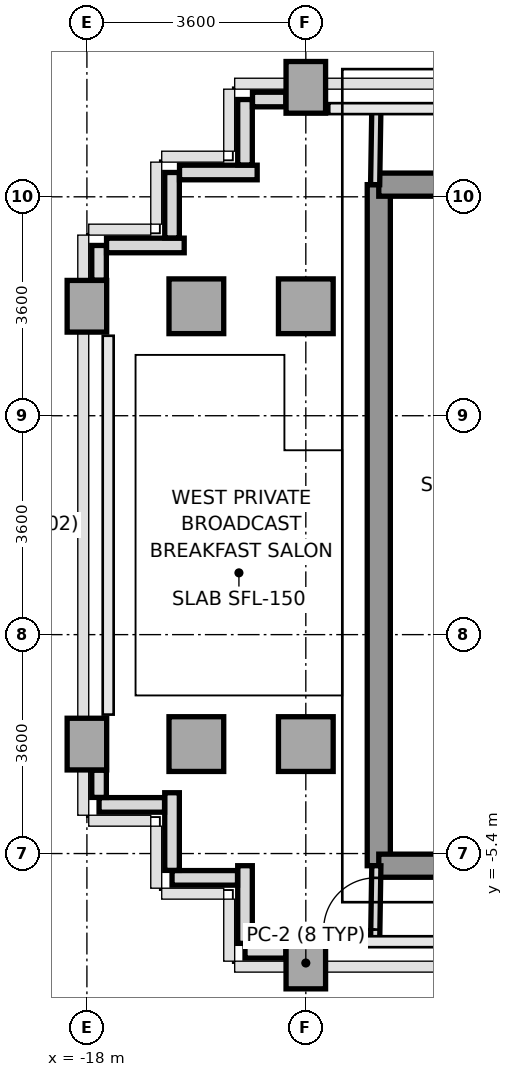
"""IFC4 building model, lengths in metres.
Left out: names, types, materials, properties, quantities, classifications, styles, units other than length and angle.
Written with IfcOpenShell. Run it as: python <this file> out.ifc"""

import sys

from ifc_helpers import new_model, si_unit, direction, frame, frame_2d, origin, origin_2d, place, context, subcontext, project, spatial, rectangle, extrude, source, transform, mapped, element, fill, save


model = new_model("IFC4")
c1 = context("Model", 3, precision=1e-05, world=origin(), true_north=direction((0.0, 1.0)))
c2 = subcontext(c1, "Body", "Model", "MODEL_VIEW")
j1 = project(units=[si_unit("LENGTHUNIT", "METRE"), si_unit("PLANEANGLEUNIT", "RADIAN")], contexts=[c1])
p1 = place(None, origin())
s1 = spatial("IfcSite", under=j1, at=p1, CompositionType="ELEMENT")
p2 = place(p1, origin())
s2 = spatial("IfcBuilding", under=s1, at=p2, CompositionType="ELEMENT")
p3 = place(p2, frame((0.0, 0.0, 194.4)))
s3 = spatial("IfcBuildingStorey", under=s2, at=p3, CompositionType="ELEMENT", Elevation=194.4)
m1 = source(origin(), c2, "Body", "SweptSolid", [
    extrude(rectangle(XDim=0.65, YDim=0.85, at=origin_2d()), origin(), (0.0, 0.0, 1.0), 3.2),
])
for number, where, z_axis, x_axis in (
    (1, (-18.0, -3.6, 0.0), (0.0, 0.0, 1.0), (1.0, 0.0, 0.0)),
    (2, (-18.0, 3.6, 0.0), (0.0, 0.0, 1.0), (1.0, 0.0, 0.0)),
):
    element("IfcColumn", number, at=place(p3, frame(where, z_axis=z_axis, x_axis=x_axis)), inside=s3, PredefinedType="COLUMN", context=c2, shape_type="MappedRepresentation", body=[
        mapped(m1, transform((0.0, 0.0, 0.0), x_axis=(1.0, 0.0, 0.0), y_axis=(0.0, 1.0, 0.0), z_axis=(0.0, 0.0, 1.0), scale=1.0)),
    ])
m2 = source(origin(), c2, "Body", "SweptSolid", [
    extrude(rectangle(XDim=0.9, YDim=0.9, at=origin_2d()), origin(), (0.0, 0.0, 1.0), 3.2),
])
for number, where, z_axis, x_axis in (
    (3, (-16.2, -3.6, 0.0), (0.0, 0.0, 1.0), (1.0, 0.0, 0.0)),
    (4, (-16.2, 3.6, 0.0), (0.0, 0.0, 1.0), (1.0, 0.0, 0.0)),
):
    element("IfcColumn", number, at=place(p3, frame(where, z_axis=z_axis, x_axis=x_axis)), inside=s3, PredefinedType="COLUMN", context=c2, shape_type="MappedRepresentation", body=[
        mapped(m2, transform((0.0, 0.0, 0.0), x_axis=(1.0, 0.0, 0.0), y_axis=(0.0, 1.0, 0.0), z_axis=(0.0, 0.0, 1.0), scale=1.0)),
    ])
p4 = place(p3, frame((-14.4, -7.2, 0.0), z_axis=(0.0, 0.0, 1.0), x_axis=(1.0, 0.0, 0.0)))
e5 = element("IfcColumn", 5, at=p4, inside=s3, PredefinedType="COLUMN", context=c2, shape_type="MappedRepresentation", body=[
    mapped(m1, transform((0.0, 0.0, 0.0), x_axis=(1.0, 0.0, 0.0), y_axis=(0.0, 1.0, 0.0), z_axis=(0.0, 0.0, 1.0), scale=1.0)),
])
for number, where, z_axis, x_axis in (
    (6, (-14.4, -3.6, 0.0), (0.0, 0.0, 1.0), (1.0, 0.0, 0.0)),
    (7, (-14.4, 3.6, 0.0), (0.0, 0.0, 1.0), (1.0, 0.0, 0.0)),
):
    element("IfcColumn", number, at=place(p3, frame(where, z_axis=z_axis, x_axis=x_axis)), inside=s3, PredefinedType="COLUMN", context=c2, shape_type="MappedRepresentation", body=[
        mapped(m2, transform((0.0, 0.0, 0.0), x_axis=(1.0, 0.0, 0.0), y_axis=(0.0, 1.0, 0.0), z_axis=(0.0, 0.0, 1.0), scale=1.0)),
    ])
p5 = place(p3, frame((-14.4, 7.2, 0.0), z_axis=(0.0, 0.0, 1.0), x_axis=(1.0, 0.0, 0.0)))
e8 = element("IfcColumn", 8, at=p5, inside=s3, PredefinedType="COLUMN", context=c2, shape_type="MappedRepresentation", body=[
    mapped(m1, transform((0.0, 0.0, 0.0), x_axis=(1.0, 0.0, 0.0), y_axis=(0.0, 1.0, 0.0), z_axis=(0.0, 0.0, 1.0), scale=1.0)),
])
p6 = place(p3, frame((-14.728, -7.0, 0.0), z_axis=(0.0, 0.0, 1.0), x_axis=(-1.0, 0.0, 0.0)))
e9 = element("IfcWall", 9, at=p6, inside=s3, PredefinedType="PARAPET", context=c2, shape_type="SweptSolid", body=[
    extrude(rectangle(XDim=0.672, YDim=0.24, at=frame_2d((0.336, 0.0))), origin(), (0.0, 0.0, 1.0), 1.15),
])
p7 = place(p3, frame((-15.4, -6.877, 0.0), z_axis=(0.0, 0.0, 1.0), x_axis=(0.0, 1.0, 0.0)))
e10 = element("IfcWall", 10, at=p7, inside=s3, PredefinedType="PARAPET", context=c2, shape_type="SweptSolid", body=[
    extrude(rectangle(XDim=1.277, YDim=0.24, at=frame_2d((0.638, 0.0))), origin(), (0.0, 0.0, 1.0), 1.15),
])
p8 = place(p3, frame((-15.523, -5.8, 0.0), z_axis=(0.0, 0.0, 1.0), x_axis=(-1.0, 0.0, 0.0)))
e11 = element("IfcWall", 11, at=p8, inside=s3, PredefinedType="PARAPET", context=c2, shape_type="SweptSolid", body=[
    extrude(rectangle(XDim=1.077, YDim=0.24, at=frame_2d((0.539, 0.0))), origin(), (0.0, 0.0, 1.0), 1.15),
])
p9 = place(p3, frame((-16.6, -5.677, 0.0), z_axis=(0.0, 0.0, 1.0), x_axis=(0.0, 1.0, 0.0)))
e12 = element("IfcWall", 12, at=p9, inside=s3, PredefinedType="PARAPET", context=c2, shape_type="SweptSolid", body=[
    extrude(rectangle(XDim=1.277, YDim=0.24, at=frame_2d((0.639, 0.0))), origin(), (0.0, 0.0, 1.0), 1.15),
])
p10 = place(p3, frame((-16.723, -4.6, 0.0), z_axis=(0.0, 0.0, 1.0), x_axis=(-1.0, 0.0, 0.0)))
e13 = element("IfcWall", 13, at=p10, inside=s3, PredefinedType="PARAPET", context=c2, shape_type="SweptSolid", body=[
    extrude(rectangle(XDim=1.077, YDim=0.24, at=frame_2d((0.539, 0.0))), origin(), (0.0, 0.0, 1.0), 1.15),
])
p11 = place(p3, frame((-17.8, -4.477, 0.0), z_axis=(0.0, 0.0, 1.0), x_axis=(0.0, 1.0, 0.0)))
e14 = element("IfcWall", 14, at=p11, inside=s3, PredefinedType="PARAPET", context=c2, shape_type="SweptSolid", body=[
    extrude(rectangle(XDim=0.449, YDim=0.24, at=frame_2d((0.225, 0.0))), origin(), (0.0, 0.0, 1.0), 1.15),
])
p12 = place(p3, frame((-17.8, 4.028, 0.0), z_axis=(0.0, 0.0, 1.0), x_axis=(0.0, 1.0, 0.0)))
e15 = element("IfcWall", 15, at=p12, inside=s3, PredefinedType="PARAPET", context=c2, shape_type="SweptSolid", body=[
    extrude(rectangle(XDim=0.572, YDim=0.24, at=frame_2d((0.286, 0.0))), origin(), (0.0, 0.0, 1.0), 1.15),
])
p13 = place(p3, frame((-17.677, 4.6, 0.0), z_axis=(0.0, 0.0, 1.0), x_axis=(1.0, 0.0, 0.0)))
e16 = element("IfcWall", 16, at=p13, inside=s3, PredefinedType="PARAPET", context=c2, shape_type="SweptSolid", body=[
    extrude(rectangle(XDim=1.277, YDim=0.24, at=frame_2d((0.639, 0.0))), origin(), (0.0, 0.0, 1.0), 1.15),
])
p14 = place(p3, frame((-16.6, 4.723, 0.0), z_axis=(0.0, 0.0, 1.0), x_axis=(0.0, 1.0, 0.0)))
e17 = element("IfcWall", 17, at=p14, inside=s3, PredefinedType="PARAPET", context=c2, shape_type="SweptSolid", body=[
    extrude(rectangle(XDim=1.077, YDim=0.24, at=frame_2d((0.539, 0.0))), origin(), (0.0, 0.0, 1.0), 1.15),
])
p15 = place(p3, frame((-16.477, 5.8, 0.0), z_axis=(0.0, 0.0, 1.0), x_axis=(1.0, 0.0, 0.0)))
e18 = element("IfcWall", 18, at=p15, inside=s3, PredefinedType="PARAPET", context=c2, shape_type="SweptSolid", body=[
    extrude(rectangle(XDim=1.277, YDim=0.24, at=frame_2d((0.639, 0.0))), origin(), (0.0, 0.0, 1.0), 1.15),
])
p16 = place(p3, frame((-15.4, 5.923, 0.0), z_axis=(0.0, 0.0, 1.0), x_axis=(0.0, 1.0, 0.0)))
e19 = element("IfcWall", 19, at=p16, inside=s3, PredefinedType="PARAPET", context=c2, shape_type="SweptSolid", body=[
    extrude(rectangle(XDim=1.077, YDim=0.24, at=frame_2d((0.539, 0.0))), origin(), (0.0, 0.0, 1.0), 1.15),
])
p17 = place(p3, frame((-15.277, 7.0, 0.0), z_axis=(0.0, 0.0, 1.0), x_axis=(1.0, 0.0, 0.0)))
e20 = element("IfcWall", 20, at=p17, inside=s3, PredefinedType="PARAPET", context=c2, shape_type="SweptSolid", body=[
    extrude(rectangle(XDim=0.549, YDim=0.24, at=frame_2d((0.274, 0.0))), origin(), (0.0, 0.0, 1.0), 1.15),
])
p18 = place(p3, frame((-13.2, -5.6, 0.0), z_axis=(0.0, 0.0, 1.0), x_axis=(0.0, 1.0, 0.0)))
e21 = element("IfcWall", 21, at=p18, inside=s3, PredefinedType="SHEAR", context=c2, shape_type="SweptSolid", body=[
    extrude(rectangle(XDim=11.2, YDim=0.38, at=frame_2d((5.6, 0.0))), origin(), (0.0, 0.0, 1.0), 3.2),
])
p19 = place(p3, frame((-13.2, 5.6, 0.0), z_axis=(0.0, 0.0, 1.0), x_axis=(1.0, 0.0, 0.0)))
e22 = element("IfcWall", 22, at=p19, inside=s3, PredefinedType="SHEAR", context=c2, shape_type="SweptSolid", body=[
    extrude(rectangle(XDim=1.844, YDim=0.38, at=frame_2d((0.922, 0.0))), origin(), (0.0, 0.0, 1.0), 3.2),
])
p20 = place(p3, frame((-13.2, -5.6, 0.0), z_axis=(0.0, 0.0, 1.0), x_axis=(1.0, 0.0, 0.0)))
e23 = element("IfcWall", 23, at=p20, inside=s3, PredefinedType="SHEAR", context=c2, shape_type="SweptSolid", body=[
    extrude(rectangle(XDim=7.8, YDim=0.38, at=frame_2d((3.9, 0.0))), origin(), (0.0, 0.0, 1.0), 3.2),
])
p21 = place(p3, frame((-13.26, 5.6, 0.0), z_axis=(0.0, 0.0, 1.0), x_axis=(0.016013571389, 0.999871774545, 0.0)))
e24 = element("IfcWall", 24, at=p21, inside=s3, PredefinedType="PARTITIONING", context=c2, shape_type="SweptSolid", body=[
    extrude(rectangle(XDim=1.25, YDim=0.15, at=frame_2d((0.625, 0.0))), origin(), (0.0, 0.0, 1.0), 3.2),
])
p22 = place(p3, frame((-13.26, -6.85, 0.0), z_axis=(0.0, 0.0, 1.0), x_axis=(0.016013571389, 0.999871774545, 0.0)))
e25 = element("IfcWall", 25, at=p22, inside=s3, PredefinedType="PARTITIONING", context=c2, shape_type="SweptSolid", body=[
    extrude(rectangle(XDim=1.25, YDim=0.15, at=frame_2d((0.625, 0.0))), origin(), (0.0, 0.0, 1.0), 3.2),
])
p23 = place(p22, frame((0.2, 0.0, 0.0)))
e26 = element("IfcOpeningElement", 26, at=p23, cuts=e25, PredefinedType="OPENING", context=c2, shape_type="SweptSolid", body=[
    extrude(rectangle(XDim=0.85, YDim=2.1, at=frame_2d((0.425, 1.05))), frame((0.0, 0.085, 0.0), z_axis=(0.0, -1.0, 0.0), x_axis=(1.0, 0.0, 0.0)), (0.0, 0.0, 1.0), 0.17),
])
m3 = source(origin(), c2, "Body", "SweptSolid", [
    extrude(rectangle(XDim=0.85, YDim=2.1, at=frame_2d((0.425, 1.05))), frame((0.0, 0.025, 0.0), z_axis=(0.0, -1.0, 0.0), x_axis=(1.0, 0.0, 0.0)), (0.0, 0.0, 1.0), 0.05),
])
p24 = place(p23, origin())
e27 = element("IfcDoor", 27, at=p24, inside=s3, OperationType="SINGLE_SWING_LEFT", PredefinedType="DOOR", context=c2, shape_type="MappedRepresentation", body=[
    mapped(m3, transform((0.0, 0.0, 0.0), x_axis=(1.0, 0.0, 0.0), y_axis=(0.0, 1.0, 0.0), z_axis=(0.0, 0.0, 1.0), scale=1.0)),
])
fill(e26, e27)
save(model, sys.argv[1])
